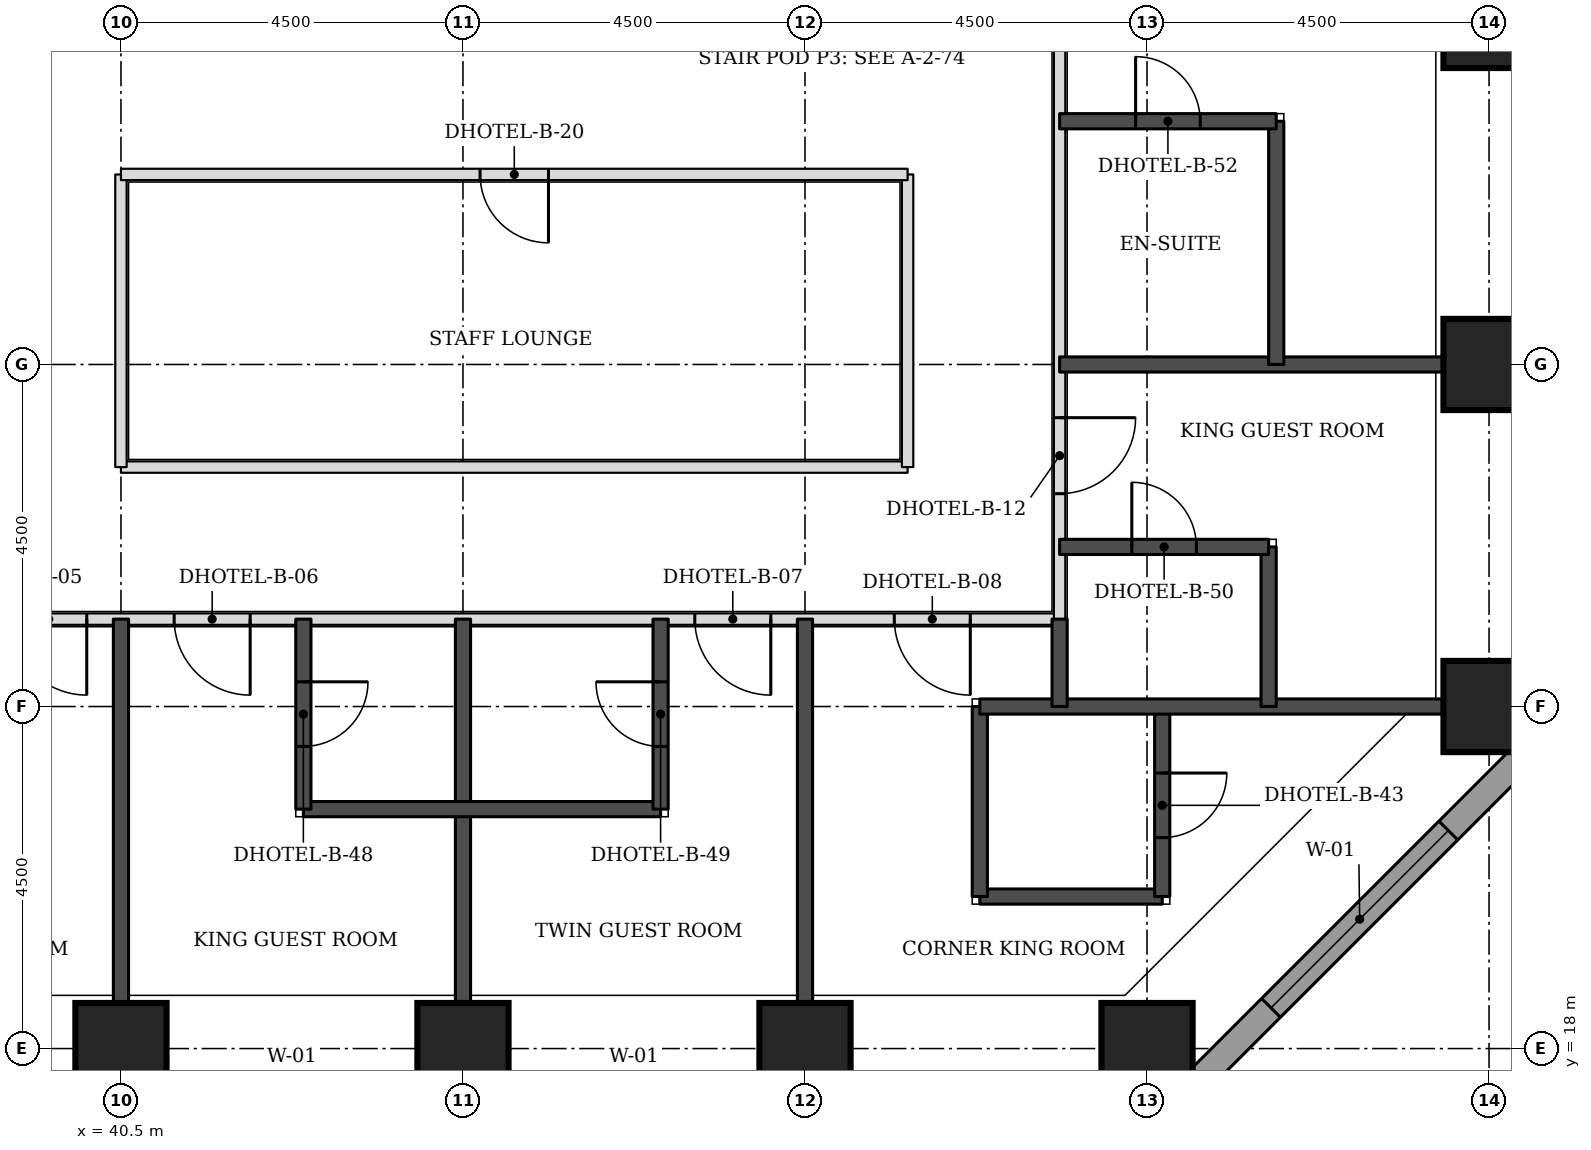
"""IFC4 building model, lengths in metres.
Left out: names, types, materials, properties, quantities, classifications, styles, units other than length and angle.
Written with IfcOpenShell. Run it as: python <this file> out.ifc"""

import sys

from ifc_helpers import new_model, si_unit, direction, frame, frame_2d, origin, origin_2d, place, context, subcontext, project, spatial, rectangle, extrude, element, fill, save


model = new_model("IFC4")
c1 = context("Model", 3, precision=1e-05, world=origin(), true_north=direction((0.0, 1.0)))
c2 = subcontext(c1, "Body", "Model", "MODEL_VIEW")
j1 = project(units=[si_unit("LENGTHUNIT", "METRE"), si_unit("PLANEANGLEUNIT", "RADIAN")], contexts=[c1])
p1 = place(None, origin())
s1 = spatial("IfcSite", under=j1, at=p1, CompositionType="ELEMENT")
p2 = place(p1, origin())
s2 = spatial("IfcBuilding", under=s1, at=p2, CompositionType="ELEMENT")
p3 = place(p2, frame((0.0, 0.0, 29.7)))
s3 = spatial("IfcBuildingStorey", under=s2, at=p3, CompositionType="ELEMENT", Elevation=29.7)
for number, where, z_axis, x_axis in (
    (1, (40.5, 18.0, 0.0), (0.0, 0.0, 1.0), (1.0, 0.0, 0.0)),
    (2, (45.0, 18.0, 0.0), (0.0, 0.0, 1.0), (1.0, 0.0, 0.0)),
    (3, (49.5, 18.0, 0.0), (0.0, 0.0, 1.0), (1.0, 0.0, 0.0)),
    (4, (54.0, 18.0, 0.0), (0.0, 0.0, 1.0), (1.0, 0.0, 0.0)),
    (5, (58.5, 22.5, 0.0), (0.0, 0.0, 1.0), (1.0, 0.0, 0.0)),
    (6, (58.5, 27.0, 0.0), (0.0, 0.0, 1.0), (1.0, 0.0, 0.0)),
    (7, (58.5, 31.5, 0.0), (0.0, 0.0, 1.0), (1.0, 0.0, 0.0)),
):
    element("IfcColumn", number, at=place(p3, frame(where, z_axis=z_axis, x_axis=x_axis)), inside=s3, PredefinedType="COLUMN", context=c2, shape_type="SweptSolid", body=[
        extrude(rectangle(XDim=1.2, YDim=1.2, at=origin_2d()), origin(), (0.0, 0.0, 1.0), 3.3),
    ])
p4 = place(p3, frame((54.27, 17.174, 0.0), z_axis=(0.0, 0.0, 1.0), x_axis=(0.707106781187, 0.707106781187, 0.0)))
e8 = element("IfcWall", 8, at=p4, inside=s3, PredefinedType="STANDARD", context=c2, shape_type="SweptSolid", body=[
    extrude(rectangle(XDim=7.151, YDim=0.35, at=frame_2d((3.576, 0.0))), origin(), (0.0, 0.0, 1.0), 3.055),
])
p5 = place(p4, frame((1.926, 0.0, 0.8)))
e9 = element("IfcOpeningElement", 9, at=p5, cuts=e8, PredefinedType="OPENING", context=c2, shape_type="SweptSolid", body=[
    extrude(rectangle(XDim=3.3, YDim=1.5, at=frame_2d((1.65, 0.75))), frame((0.0, 0.185, 0.0), z_axis=(0.0, -1.0, 0.0), x_axis=(1.0, 0.0, 0.0)), (0.0, 0.0, 1.0), 0.37),
])
p6 = place(p3, frame((20.65, 23.65, 0.0), z_axis=(0.0, 0.0, 1.0), x_axis=(1.0, 0.0, 0.0)))
e10 = element("IfcWall", 10, at=p6, inside=s3, PredefinedType="PARTITIONING", context=c2, shape_type="SweptSolid", body=[
    extrude(rectangle(XDim=32.2, YDim=0.15, at=frame_2d((16.1, 0.0))), origin(), (0.0, 0.0, 1.0), 3.08),
])
p7 = place(p6, frame((2.55, 0.0, 0.0)))
e11 = element("IfcOpeningElement", 11, at=p7, cuts=e10, PredefinedType="OPENING", context=c2, shape_type="SweptSolid", body=[
    extrude(rectangle(XDim=1.0, YDim=2.1, at=frame_2d((0.5, 1.05))), frame((0.0, 0.085, 0.0), z_axis=(0.0, -1.0, 0.0), x_axis=(1.0, 0.0, 0.0)), (0.0, 0.0, 1.0), 0.17),
])
p8 = place(p6, frame((9.4, 0.0, 0.0)))
e12 = element("IfcOpeningElement", 12, at=p8, cuts=e10, PredefinedType="OPENING", context=c2, shape_type="SweptSolid", body=[
    extrude(rectangle(XDim=1.0, YDim=2.1, at=frame_2d((0.5, 1.05))), frame((0.0, 0.085, 0.0), z_axis=(0.0, -1.0, 0.0), x_axis=(1.0, 0.0, 0.0)), (0.0, 0.0, 1.0), 0.17),
])
p9 = place(p6, frame((11.55, 0.0, 0.0)))
e13 = element("IfcOpeningElement", 13, at=p9, cuts=e10, PredefinedType="OPENING", context=c2, shape_type="SweptSolid", body=[
    extrude(rectangle(XDim=1.0, YDim=2.1, at=frame_2d((0.5, 1.05))), frame((0.0, 0.085, 0.0), z_axis=(0.0, -1.0, 0.0), x_axis=(1.0, 0.0, 0.0)), (0.0, 0.0, 1.0), 0.17),
])
p10 = place(p6, frame((18.4, 0.0, 0.0)))
e14 = element("IfcOpeningElement", 14, at=p10, cuts=e10, PredefinedType="OPENING", context=c2, shape_type="SweptSolid", body=[
    extrude(rectangle(XDim=1.0, YDim=2.1, at=frame_2d((0.5, 1.05))), frame((0.0, 0.085, 0.0), z_axis=(0.0, -1.0, 0.0), x_axis=(1.0, 0.0, 0.0)), (0.0, 0.0, 1.0), 0.17),
])
p11 = place(p6, frame((20.55, 0.0, 0.0)))
e15 = element("IfcOpeningElement", 15, at=p11, cuts=e10, PredefinedType="OPENING", context=c2, shape_type="SweptSolid", body=[
    extrude(rectangle(XDim=1.0, YDim=2.1, at=frame_2d((0.5, 1.05))), frame((0.0, 0.085, 0.0), z_axis=(0.0, -1.0, 0.0), x_axis=(1.0, 0.0, 0.0)), (0.0, 0.0, 1.0), 0.17),
])
p12 = place(p6, frame((27.4, 0.0, 0.0)))
e16 = element("IfcOpeningElement", 16, at=p12, cuts=e10, PredefinedType="OPENING", context=c2, shape_type="SweptSolid", body=[
    extrude(rectangle(XDim=1.0, YDim=2.1, at=frame_2d((0.5, 1.05))), frame((0.0, 0.085, 0.0), z_axis=(0.0, -1.0, 0.0), x_axis=(1.0, 0.0, 0.0)), (0.0, 0.0, 1.0), 0.17),
])
p13 = place(p6, frame((0.425, 0.0, 0.0)))
e17 = element("IfcOpeningElement", 17, at=p13, cuts=e10, PredefinedType="OPENING", context=c2, shape_type="SweptSolid", body=[
    extrude(rectangle(XDim=1.0, YDim=2.1, at=frame_2d((0.5, 1.05))), frame((0.0, 0.085, 0.0), z_axis=(0.0, -1.0, 0.0), x_axis=(1.0, 0.0, 0.0)), (0.0, 0.0, 1.0), 0.17),
])
p14 = place(p6, frame((30.025, 0.0, 0.0)))
e18 = element("IfcOpeningElement", 18, at=p14, cuts=e10, PredefinedType="OPENING", context=c2, shape_type="SweptSolid", body=[
    extrude(rectangle(XDim=1.0, YDim=2.1, at=frame_2d((0.5, 1.05))), frame((0.0, 0.085, 0.0), z_axis=(0.0, -1.0, 0.0), x_axis=(1.0, 0.0, 0.0)), (0.0, 0.0, 1.0), 0.17),
])
p15 = place(p3, frame((52.85, 23.65, 0.0), z_axis=(0.0, 0.0, 1.0), x_axis=(0.0, 1.0, 0.0)))
e19 = element("IfcWall", 19, at=p15, inside=s3, PredefinedType="PARTITIONING", context=c2, shape_type="SweptSolid", body=[
    extrude(rectangle(XDim=23.85, YDim=0.15, at=frame_2d((11.925, 0.0))), origin(), (0.0, 0.0, 1.0), 3.08),
])
p16 = place(p15, frame((1.65, 0.0, 0.0)))
e20 = element("IfcOpeningElement", 20, at=p16, cuts=e19, PredefinedType="OPENING", context=c2, shape_type="SweptSolid", body=[
    extrude(rectangle(XDim=1.0, YDim=2.1, at=frame_2d((0.5, 1.05))), frame((0.0, 0.085, 0.0), z_axis=(0.0, -1.0, 0.0), x_axis=(1.0, 0.0, 0.0)), (0.0, 0.0, 1.0), 0.17),
])
p17 = place(p15, frame((8.95, 0.0, 0.0)))
e21 = element("IfcOpeningElement", 21, at=p17, cuts=e19, PredefinedType="OPENING", context=c2, shape_type="SweptSolid", body=[
    extrude(rectangle(XDim=1.0, YDim=2.1, at=frame_2d((0.5, 1.05))), frame((0.0, 0.085, 0.0), z_axis=(0.0, -1.0, 0.0), x_axis=(1.0, 0.0, 0.0)), (0.0, 0.0, 1.0), 0.17),
])
p18 = place(p15, frame((13.05, 0.0, 0.0)))
e22 = element("IfcOpeningElement", 22, at=p18, cuts=e19, PredefinedType="OPENING", context=c2, shape_type="SweptSolid", body=[
    extrude(rectangle(XDim=1.0, YDim=2.1, at=frame_2d((0.5, 1.05))), frame((0.0, 0.085, 0.0), z_axis=(0.0, -1.0, 0.0), x_axis=(1.0, 0.0, 0.0)), (0.0, 0.0, 1.0), 0.17),
])
p19 = place(p15, frame((19.9, 0.0, 0.0)))
e23 = element("IfcOpeningElement", 23, at=p19, cuts=e19, PredefinedType="OPENING", context=c2, shape_type="SweptSolid", body=[
    extrude(rectangle(XDim=0.9, YDim=2.1, at=frame_2d((0.45, 1.05))), frame((0.0, 0.085, 0.0), z_axis=(0.0, -1.0, 0.0), x_axis=(1.0, 0.0, 0.0)), (0.0, 0.0, 1.0), 0.17),
])
p20 = place(p3, frame((40.5, 25.65, 0.0), z_axis=(0.0, 0.0, 1.0), x_axis=(1.0, 0.0, 0.0)))
e24 = element("IfcWall", 24, at=p20, inside=s3, PredefinedType="PARTITIONING", context=c2, shape_type="SweptSolid", body=[
    extrude(rectangle(XDim=10.35, YDim=0.15, at=frame_2d((5.175, 0.0))), origin(), (0.0, 0.0, 1.0), 3.08),
])
for number, where, z_axis, x_axis in (
    (25, (40.5, 25.65, 0.0), (0.0, 0.0, 1.0), (0.0, 1.0, 0.0)),
    (26, (50.85, 25.65, 0.0), (0.0, 0.0, 1.0), (0.0, 1.0, 0.0)),
):
    element("IfcWall", number, at=place(p3, frame(where, z_axis=z_axis, x_axis=x_axis)), inside=s3, PredefinedType="PARTITIONING", context=c2, shape_type="SweptSolid", body=[
        extrude(rectangle(XDim=3.85, YDim=0.15, at=frame_2d((1.925, 0.0))), origin(), (0.0, 0.0, 1.0), 3.08),
    ])
p21 = place(p3, frame((40.5, 29.5, 0.0), z_axis=(0.0, 0.0, 1.0), x_axis=(1.0, 0.0, 0.0)))
e27 = element("IfcWall", 27, at=p21, inside=s3, PredefinedType="PARTITIONING", context=c2, shape_type="SweptSolid", body=[
    extrude(rectangle(XDim=10.35, YDim=0.15, at=frame_2d((5.175, 0.0))), origin(), (0.0, 0.0, 1.0), 3.08),
])
p22 = place(p21, frame((4.725, 0.0, 0.0)))
e28 = element("IfcOpeningElement", 28, at=p22, cuts=e27, PredefinedType="OPENING", context=c2, shape_type="SweptSolid", body=[
    extrude(rectangle(XDim=0.9, YDim=2.1, at=frame_2d((0.45, 1.05))), frame((0.0, 0.085, 0.0), z_axis=(0.0, -1.0, 0.0), x_axis=(1.0, 0.0, 0.0)), (0.0, 0.0, 1.0), 0.17),
])
for number, where, z_axis, x_axis in (
    (29, (40.5, 18.6, 0.0), (0.0, 0.0, 1.0), (0.0, 1.0, 0.0)),
    (30, (45.0, 18.6, 0.0), (0.0, 0.0, 1.0), (0.0, 1.0, 0.0)),
    (31, (49.5, 18.6, 0.0), (0.0, 0.0, 1.0), (0.0, 1.0, 0.0)),
):
    element("IfcWall", number, at=place(p3, frame(where, z_axis=z_axis, x_axis=x_axis)), inside=s3, PredefinedType="SOLIDWALL", context=c2, shape_type="SweptSolid", body=[
        extrude(rectangle(XDim=5.05, YDim=0.2, at=frame_2d((2.525, 0.0))), origin(), (0.0, 0.0, 1.0), 3.08),
    ])
p23 = place(p3, frame((51.8, 20.0, 0.0), z_axis=(0.0, 0.0, 1.0), x_axis=(1.0, 0.0, 0.0)))
e32 = element("IfcWall", 32, at=p23, inside=s3, PredefinedType="SOLIDWALL", context=c2, shape_type="SweptSolid", body=[
    extrude(rectangle(XDim=2.4, YDim=0.2, at=frame_2d((1.2, 0.0))), origin(), (0.0, 0.0, 1.0), 3.08),
])
p24 = place(p3, frame((51.8, 20.0, 0.0), z_axis=(0.0, 0.0, 1.0), x_axis=(0.0, 1.0, 0.0)))
e33 = element("IfcWall", 33, at=p24, inside=s3, PredefinedType="SOLIDWALL", context=c2, shape_type="SweptSolid", body=[
    extrude(rectangle(XDim=2.5, YDim=0.2, at=frame_2d((1.25, 0.0))), origin(), (0.0, 0.0, 1.0), 3.08),
])
p25 = place(p3, frame((54.2, 20.0, 0.0), z_axis=(0.0, 0.0, 1.0), x_axis=(0.0, 1.0, 0.0)))
e34 = element("IfcWall", 34, at=p25, inside=s3, PredefinedType="SOLIDWALL", context=c2, shape_type="SweptSolid", body=[
    extrude(rectangle(XDim=2.5, YDim=0.2, at=frame_2d((1.25, 0.0))), origin(), (0.0, 0.0, 1.0), 3.08),
])
p26 = place(p25, frame((0.775, 0.0, 0.0)))
e35 = element("IfcOpeningElement", 35, at=p26, cuts=e34, PredefinedType="OPENING", context=c2, shape_type="SweptSolid", body=[
    extrude(rectangle(XDim=0.85, YDim=2.1, at=frame_2d((0.425, 1.05))), frame((0.0, 0.11, 0.0), z_axis=(0.0, -1.0, 0.0), x_axis=(1.0, 0.0, 0.0)), (0.0, 0.0, 1.0), 0.22),
])
p27 = place(p3, frame((42.9, 21.15, 0.0), z_axis=(0.0, 0.0, 1.0), x_axis=(1.0, 0.0, 0.0)))
e36 = element("IfcWall", 36, at=p27, inside=s3, PredefinedType="SOLIDWALL", context=c2, shape_type="SweptSolid", body=[
    extrude(rectangle(XDim=4.7, YDim=0.2, at=frame_2d((2.35, 0.0))), origin(), (0.0, 0.0, 1.0), 3.08),
])
p28 = place(p3, frame((42.9, 21.15, 0.0), z_axis=(0.0, 0.0, 1.0), x_axis=(0.0, 1.0, 0.0)))
e37 = element("IfcWall", 37, at=p28, inside=s3, PredefinedType="SOLIDWALL", context=c2, shape_type="SweptSolid", body=[
    extrude(rectangle(XDim=2.5, YDim=0.2, at=frame_2d((1.25, 0.0))), origin(), (0.0, 0.0, 1.0), 3.08),
])
p29 = place(p28, frame((0.825, 0.0, 0.0)))
e38 = element("IfcOpeningElement", 38, at=p29, cuts=e37, PredefinedType="OPENING", context=c2, shape_type="SweptSolid", body=[
    extrude(rectangle(XDim=0.85, YDim=2.1, at=frame_2d((0.425, 1.05))), frame((0.0, 0.11, 0.0), z_axis=(0.0, -1.0, 0.0), x_axis=(1.0, 0.0, 0.0)), (0.0, 0.0, 1.0), 0.22),
])
p30 = place(p3, frame((47.6, 21.15, 0.0), z_axis=(0.0, 0.0, 1.0), x_axis=(0.0, 1.0, 0.0)))
e39 = element("IfcWall", 39, at=p30, inside=s3, PredefinedType="SOLIDWALL", context=c2, shape_type="SweptSolid", body=[
    extrude(rectangle(XDim=2.5, YDim=0.2, at=frame_2d((1.25, 0.0))), origin(), (0.0, 0.0, 1.0), 3.08),
])
p31 = place(p30, frame((0.825, 0.0, 0.0)))
e40 = element("IfcOpeningElement", 40, at=p31, cuts=e39, PredefinedType="OPENING", context=c2, shape_type="SweptSolid", body=[
    extrude(rectangle(XDim=0.85, YDim=2.1, at=frame_2d((0.425, 1.05))), frame((0.0, 0.11, 0.0), z_axis=(0.0, -1.0, 0.0), x_axis=(1.0, 0.0, 0.0)), (0.0, 0.0, 1.0), 0.22),
])
p32 = place(p3, frame((51.8, 22.5, 0.0), z_axis=(0.0, 0.0, 1.0), x_axis=(1.0, 0.0, 0.0)))
e41 = element("IfcWall", 41, at=p32, inside=s3, PredefinedType="SOLIDWALL", context=c2, shape_type="SweptSolid", body=[
    extrude(rectangle(XDim=6.1, YDim=0.2, at=frame_2d((3.05, 0.0))), origin(), (0.0, 0.0, 1.0), 3.08),
])
p33 = place(p3, frame((52.85, 22.5, 0.0), z_axis=(0.0, 0.0, 1.0), x_axis=(0.0, 1.0, 0.0)))
e42 = element("IfcWall", 42, at=p33, inside=s3, PredefinedType="SOLIDWALL", context=c2, shape_type="SweptSolid", body=[
    extrude(rectangle(XDim=1.15, YDim=0.2, at=frame_2d((0.575, 0.0))), origin(), (0.0, 0.0, 1.0), 3.08),
])
p34 = place(p3, frame((55.6, 22.5, 0.0), z_axis=(0.0, 0.0, 1.0), x_axis=(0.0, 1.0, 0.0)))
e43 = element("IfcWall", 43, at=p34, inside=s3, PredefinedType="SOLIDWALL", context=c2, shape_type="SweptSolid", body=[
    extrude(rectangle(XDim=2.1, YDim=0.2, at=frame_2d((1.05, 0.0))), origin(), (0.0, 0.0, 1.0), 3.08),
])
p35 = place(p3, frame((52.85, 24.6, 0.0), z_axis=(0.0, 0.0, 1.0), x_axis=(1.0, 0.0, 0.0)))
e44 = element("IfcWall", 44, at=p35, inside=s3, PredefinedType="SOLIDWALL", context=c2, shape_type="SweptSolid", body=[
    extrude(rectangle(XDim=2.75, YDim=0.2, at=frame_2d((1.375, 0.0))), origin(), (0.0, 0.0, 1.0), 3.08),
])
p36 = place(p35, frame((0.95, 0.0, 0.0)))
e45 = element("IfcOpeningElement", 45, at=p36, cuts=e44, PredefinedType="OPENING", context=c2, shape_type="SweptSolid", body=[
    extrude(rectangle(XDim=0.85, YDim=2.1, at=frame_2d((0.425, 1.05))), frame((0.0, 0.11, 0.0), z_axis=(0.0, -1.0, 0.0), x_axis=(1.0, 0.0, 0.0)), (0.0, 0.0, 1.0), 0.22),
])
p37 = place(p3, frame((52.85, 27.0, 0.0), z_axis=(0.0, 0.0, 1.0), x_axis=(1.0, 0.0, 0.0)))
e46 = element("IfcWall", 46, at=p37, inside=s3, PredefinedType="SOLIDWALL", context=c2, shape_type="SweptSolid", body=[
    extrude(rectangle(XDim=5.05, YDim=0.2, at=frame_2d((2.525, 0.0))), origin(), (0.0, 0.0, 1.0), 3.08),
])
p38 = place(p3, frame((55.7, 27.0, 0.0), z_axis=(0.0, 0.0, 1.0), x_axis=(0.0, 1.0, 0.0)))
e47 = element("IfcWall", 47, at=p38, inside=s3, PredefinedType="SOLIDWALL", context=c2, shape_type="SweptSolid", body=[
    extrude(rectangle(XDim=3.2, YDim=0.2, at=frame_2d((1.6, 0.0))), origin(), (0.0, 0.0, 1.0), 3.08),
])
p39 = place(p3, frame((52.85, 30.2, 0.0), z_axis=(0.0, 0.0, 1.0), x_axis=(1.0, 0.0, 0.0)))
e48 = element("IfcWall", 48, at=p39, inside=s3, PredefinedType="SOLIDWALL", context=c2, shape_type="SweptSolid", body=[
    extrude(rectangle(XDim=2.85, YDim=0.2, at=frame_2d((1.425, 0.0))), origin(), (0.0, 0.0, 1.0), 3.08),
])
p40 = place(p39, frame((1.0, 0.0, 0.0)))
e49 = element("IfcOpeningElement", 49, at=p40, cuts=e48, PredefinedType="OPENING", context=c2, shape_type="SweptSolid", body=[
    extrude(rectangle(XDim=0.85, YDim=2.1, at=frame_2d((0.425, 1.05))), frame((0.0, 0.11, 0.0), z_axis=(0.0, -1.0, 0.0), x_axis=(1.0, 0.0, 0.0)), (0.0, 0.0, 1.0), 0.22),
])
p41 = place(p5, origin())
e50 = element("IfcWindow", 50, at=p41, inside=s3, PartitioningType="SINGLE_PANEL", PredefinedType="WINDOW", context=c2, shape_type="SweptSolid", body=[
    extrude(rectangle(XDim=3.3, YDim=1.5, at=frame_2d((1.65, 0.75))), frame((0.0, 0.085, 0.0), z_axis=(0.0, -1.0, 0.0), x_axis=(1.0, 0.0, 0.0)), (0.0, 0.0, 1.0), 0.06),
])
fill(e9, e50)
p42 = place(p10, frame((1.0, 0.0, 0.0), z_axis=(0.0, 0.0, 1.0), x_axis=(-1.0, 0.0, 0.0)))
e51 = element("IfcDoor", 51, at=p42, inside=s3, OperationType="SINGLE_SWING_LEFT", PredefinedType="DOOR", context=c2, shape_type="SweptSolid", body=[
    extrude(rectangle(XDim=1.0, YDim=2.1, at=frame_2d((0.5, 1.05))), frame((0.0, 0.025, 0.0), z_axis=(0.0, -1.0, 0.0), x_axis=(1.0, 0.0, 0.0)), (0.0, 0.0, 1.0), 0.05),
])
fill(e14, e51)
p43 = place(p11, frame((1.0, 0.0, 0.0), z_axis=(0.0, 0.0, 1.0), x_axis=(-1.0, 0.0, 0.0)))
e52 = element("IfcDoor", 52, at=p43, inside=s3, OperationType="SINGLE_SWING_LEFT", PredefinedType="DOOR", context=c2, shape_type="SweptSolid", body=[
    extrude(rectangle(XDim=1.0, YDim=2.1, at=frame_2d((0.5, 1.05))), frame((0.0, 0.025, 0.0), z_axis=(0.0, -1.0, 0.0), x_axis=(1.0, 0.0, 0.0)), (0.0, 0.0, 1.0), 0.05),
])
fill(e15, e52)
p44 = place(p29, frame((0.85, 0.0, 0.0), z_axis=(0.0, 0.0, 1.0), x_axis=(-1.0, 0.0, 0.0)))
e53 = element("IfcDoor", 53, at=p44, inside=s3, OperationType="SINGLE_SWING_LEFT", PredefinedType="DOOR", context=c2, shape_type="SweptSolid", body=[
    extrude(rectangle(XDim=0.85, YDim=2.1, at=frame_2d((0.425, 1.05))), frame((0.0, 0.025, 0.0), z_axis=(0.0, -1.0, 0.0), x_axis=(1.0, 0.0, 0.0)), (0.0, 0.0, 1.0), 0.05),
])
fill(e38, e53)
p45 = place(p12, frame((1.0, 0.0, 0.0), z_axis=(0.0, 0.0, 1.0), x_axis=(-1.0, 0.0, 0.0)))
e54 = element("IfcDoor", 54, at=p45, inside=s3, OperationType="SINGLE_SWING_LEFT", PredefinedType="DOOR", context=c2, shape_type="SweptSolid", body=[
    extrude(rectangle(XDim=1.0, YDim=2.1, at=frame_2d((0.5, 1.05))), frame((0.0, 0.025, 0.0), z_axis=(0.0, -1.0, 0.0), x_axis=(1.0, 0.0, 0.0)), (0.0, 0.0, 1.0), 0.05),
])
fill(e16, e54)
p46 = place(p31, origin())
e55 = element("IfcDoor", 55, at=p46, inside=s3, OperationType="SINGLE_SWING_RIGHT", PredefinedType="DOOR", context=c2, shape_type="SweptSolid", body=[
    extrude(rectangle(XDim=0.85, YDim=2.1, at=frame_2d((0.425, 1.05))), frame((0.0, 0.025, 0.0), z_axis=(0.0, -1.0, 0.0), x_axis=(1.0, 0.0, 0.0)), (0.0, 0.0, 1.0), 0.05),
])
fill(e40, e55)
p47 = place(p16, frame((1.0, 0.0, 0.0), z_axis=(0.0, 0.0, 1.0), x_axis=(-1.0, 0.0, 0.0)))
e56 = element("IfcDoor", 56, at=p47, inside=s3, OperationType="SINGLE_SWING_LEFT", PredefinedType="DOOR", context=c2, shape_type="SweptSolid", body=[
    extrude(rectangle(XDim=1.0, YDim=2.1, at=frame_2d((0.5, 1.05))), frame((0.0, 0.025, 0.0), z_axis=(0.0, -1.0, 0.0), x_axis=(1.0, 0.0, 0.0)), (0.0, 0.0, 1.0), 0.05),
])
fill(e20, e56)
p48 = place(p36, origin())
e57 = element("IfcDoor", 57, at=p48, inside=s3, OperationType="SINGLE_SWING_LEFT", PredefinedType="DOOR", context=c2, shape_type="SweptSolid", body=[
    extrude(rectangle(XDim=0.85, YDim=2.1, at=frame_2d((0.425, 1.05))), frame((0.0, 0.025, 0.0), z_axis=(0.0, -1.0, 0.0), x_axis=(1.0, 0.0, 0.0)), (0.0, 0.0, 1.0), 0.05),
])
fill(e45, e57)
p49 = place(p40, origin())
e58 = element("IfcDoor", 58, at=p49, inside=s3, OperationType="SINGLE_SWING_LEFT", PredefinedType="DOOR", context=c2, shape_type="SweptSolid", body=[
    extrude(rectangle(XDim=0.85, YDim=2.1, at=frame_2d((0.425, 1.05))), frame((0.0, 0.025, 0.0), z_axis=(0.0, -1.0, 0.0), x_axis=(1.0, 0.0, 0.0)), (0.0, 0.0, 1.0), 0.05),
])
fill(e49, e58)
p50 = place(p14, frame((1.0, 0.0, 0.0), z_axis=(0.0, 0.0, 1.0), x_axis=(-1.0, 0.0, 0.0)))
e59 = element("IfcDoor", 59, at=p50, inside=s3, OperationType="SINGLE_SWING_LEFT", PredefinedType="DOOR", context=c2, shape_type="SweptSolid", body=[
    extrude(rectangle(XDim=1.0, YDim=2.1, at=frame_2d((0.5, 1.05))), frame((0.0, 0.025, 0.0), z_axis=(0.0, -1.0, 0.0), x_axis=(1.0, 0.0, 0.0)), (0.0, 0.0, 1.0), 0.05),
])
fill(e18, e59)
p51 = place(p26, frame((0.85, 0.0, 0.0), z_axis=(0.0, 0.0, 1.0), x_axis=(-1.0, 0.0, 0.0)))
e60 = element("IfcDoor", 60, at=p51, inside=s3, OperationType="SINGLE_SWING_LEFT", PredefinedType="DOOR", context=c2, shape_type="SweptSolid", body=[
    extrude(rectangle(XDim=0.85, YDim=2.1, at=frame_2d((0.425, 1.05))), frame((0.0, 0.025, 0.0), z_axis=(0.0, -1.0, 0.0), x_axis=(1.0, 0.0, 0.0)), (0.0, 0.0, 1.0), 0.05),
])
fill(e35, e60)
p52 = place(p22, frame((0.9, 0.0, 0.0), z_axis=(0.0, 0.0, 1.0), x_axis=(-1.0, 0.0, 0.0)))
e61 = element("IfcDoor", 61, at=p52, inside=s3, OperationType="SINGLE_SWING_LEFT", PredefinedType="DOOR", context=c2, shape_type="SweptSolid", body=[
    extrude(rectangle(XDim=0.9, YDim=2.1, at=frame_2d((0.45, 1.05))), frame((0.0, 0.025, 0.0), z_axis=(0.0, -1.0, 0.0), x_axis=(1.0, 0.0, 0.0)), (0.0, 0.0, 1.0), 0.05),
])
fill(e28, e61)
save(model, sys.argv[1])
